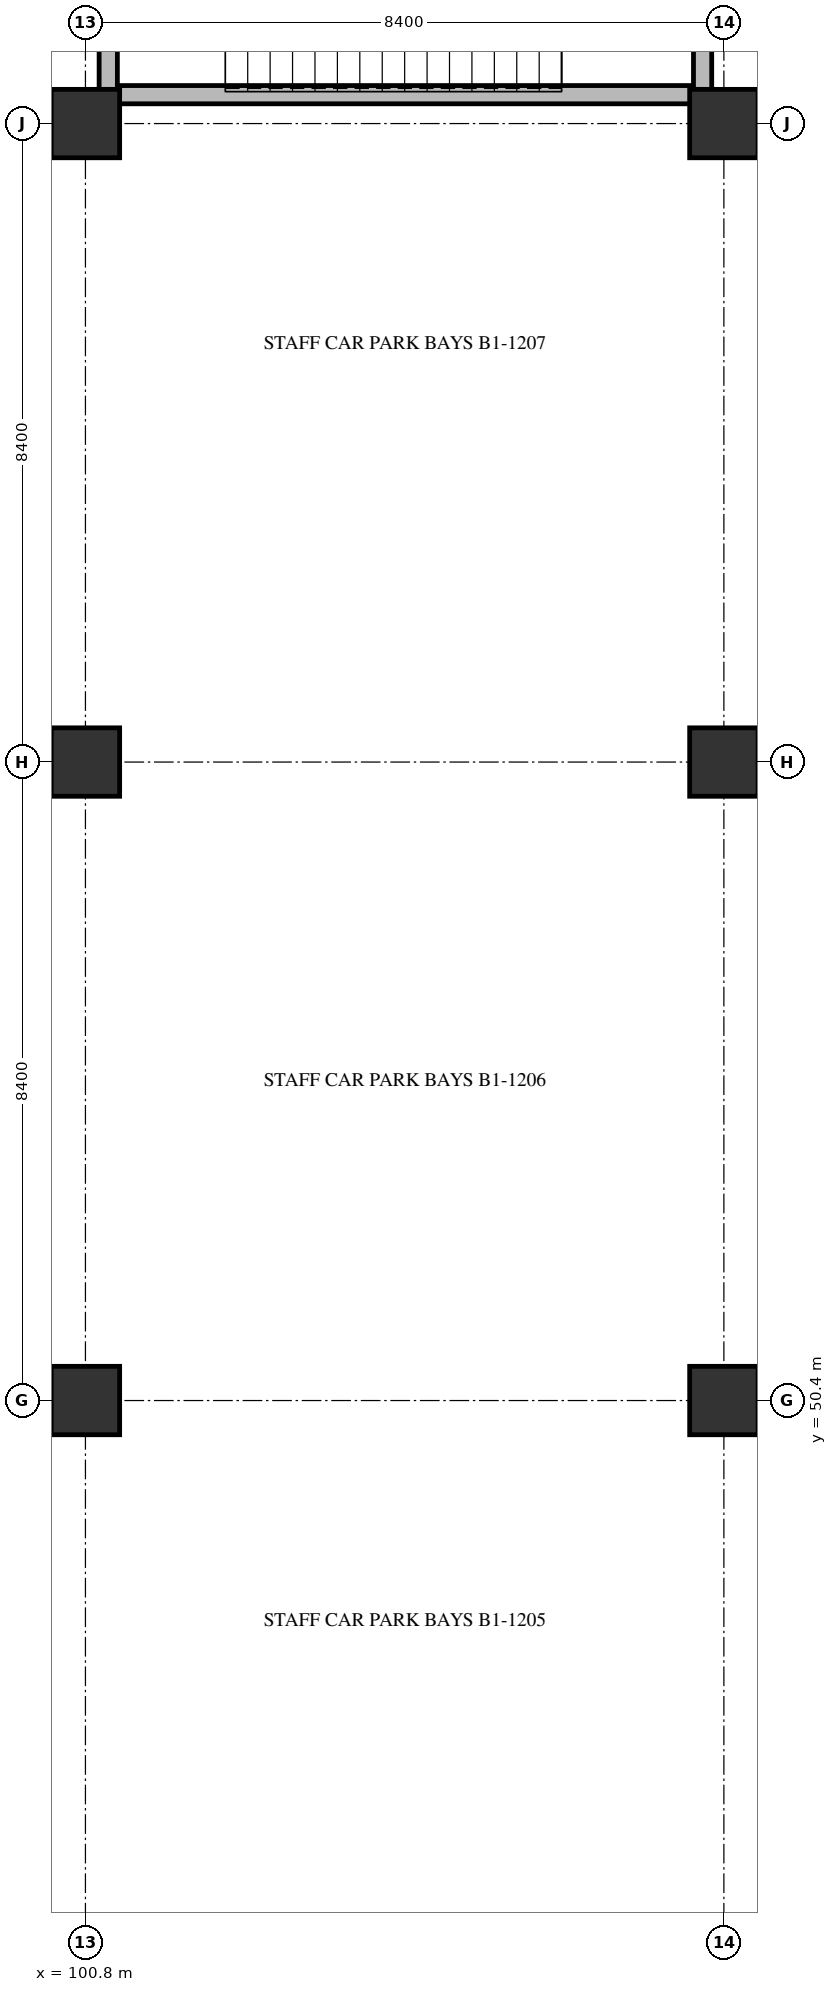
"""IFC4 building model, lengths in metres.
Left out: names, types, materials, properties, quantities, classifications, styles, units other than length and angle.
Written with IfcOpenShell. Run it as: python <this file> out.ifc"""

import sys

from ifc_helpers import new_model, si_unit, direction, frame, frame_2d, origin, origin_2d, place, context, subcontext, project, spatial, rectangle, extrude, element, save


model = new_model("IFC4")
c1 = context("Model", 3, precision=1e-05, world=origin(), true_north=direction((0.0, 1.0)))
c2 = subcontext(c1, "Body", "Model", "MODEL_VIEW")
j1 = project(units=[si_unit("LENGTHUNIT", "METRE"), si_unit("PLANEANGLEUNIT", "RADIAN")], contexts=[c1])
p1 = place(None, origin())
s1 = spatial("IfcSite", under=j1, at=p1, CompositionType="ELEMENT")
p2 = place(p1, origin())
s2 = spatial("IfcBuilding", under=s1, at=p2, CompositionType="ELEMENT")
p3 = place(p2, frame((0.0, 0.0, -5.4)))
s3 = spatial("IfcBuildingStorey", under=s2, at=p3, CompositionType="ELEMENT", Elevation=-5.4)
for number, where, z_axis, x_axis in (
    (1, (100.8, 50.4, 0.0), (0.0, 0.0, 1.0), (1.0, 0.0, 0.0)),
    (2, (100.8, 58.8, 0.0), (0.0, 0.0, 1.0), (1.0, 0.0, 0.0)),
    (3, (100.8, 67.2, 0.0), (0.0, 0.0, 1.0), (1.0, 0.0, 0.0)),
    (4, (109.2, 50.4, 0.0), (0.0, 0.0, 1.0), (1.0, 0.0, 0.0)),
    (5, (109.2, 58.8, 0.0), (0.0, 0.0, 1.0), (1.0, 0.0, 0.0)),
    (6, (109.2, 67.2, 0.0), (0.0, 0.0, 1.0), (1.0, 0.0, 0.0)),
):
    element("IfcColumn", number, at=place(p3, frame(where, z_axis=z_axis, x_axis=x_axis)), inside=s3, PredefinedType="COLUMN", context=c2, shape_type="SweptSolid", body=[
        extrude(rectangle(XDim=0.9, YDim=0.9, at=origin_2d()), origin(), (0.0, 0.0, 1.0), 5.4),
    ])
p4 = place(p3, frame((101.1, 67.58, 0.0), z_axis=(0.0, 0.0, 1.0), x_axis=(1.0, 0.0, 0.0)))
e7 = element("IfcWall", 7, at=p4, inside=s3, PredefinedType="SHEAR", context=c2, shape_type="SweptSolid", body=[
    extrude(rectangle(XDim=7.82, YDim=0.24, at=frame_2d((3.91, 0.0))), origin(), (0.0, 0.0, 1.0), 5.08),
])
for number, where, z_axis, x_axis in (
    (8, (101.1, 67.58, 0.0), (0.0, 0.0, 1.0), (0.0, 1.0, 0.0)),
    (9, (108.92, 67.58, 0.0), (0.0, 0.0, 1.0), (0.0, 1.0, 0.0)),
):
    element("IfcWall", number, at=place(p3, frame(where, z_axis=z_axis, x_axis=x_axis)), inside=s3, PredefinedType="SHEAR", context=c2, shape_type="SweptSolid", body=[
        extrude(rectangle(XDim=3.32, YDim=0.24, at=frame_2d((1.66, 0.0))), origin(), (0.0, 0.0, 1.0), 5.08),
    ])
save(model, sys.argv[1])
